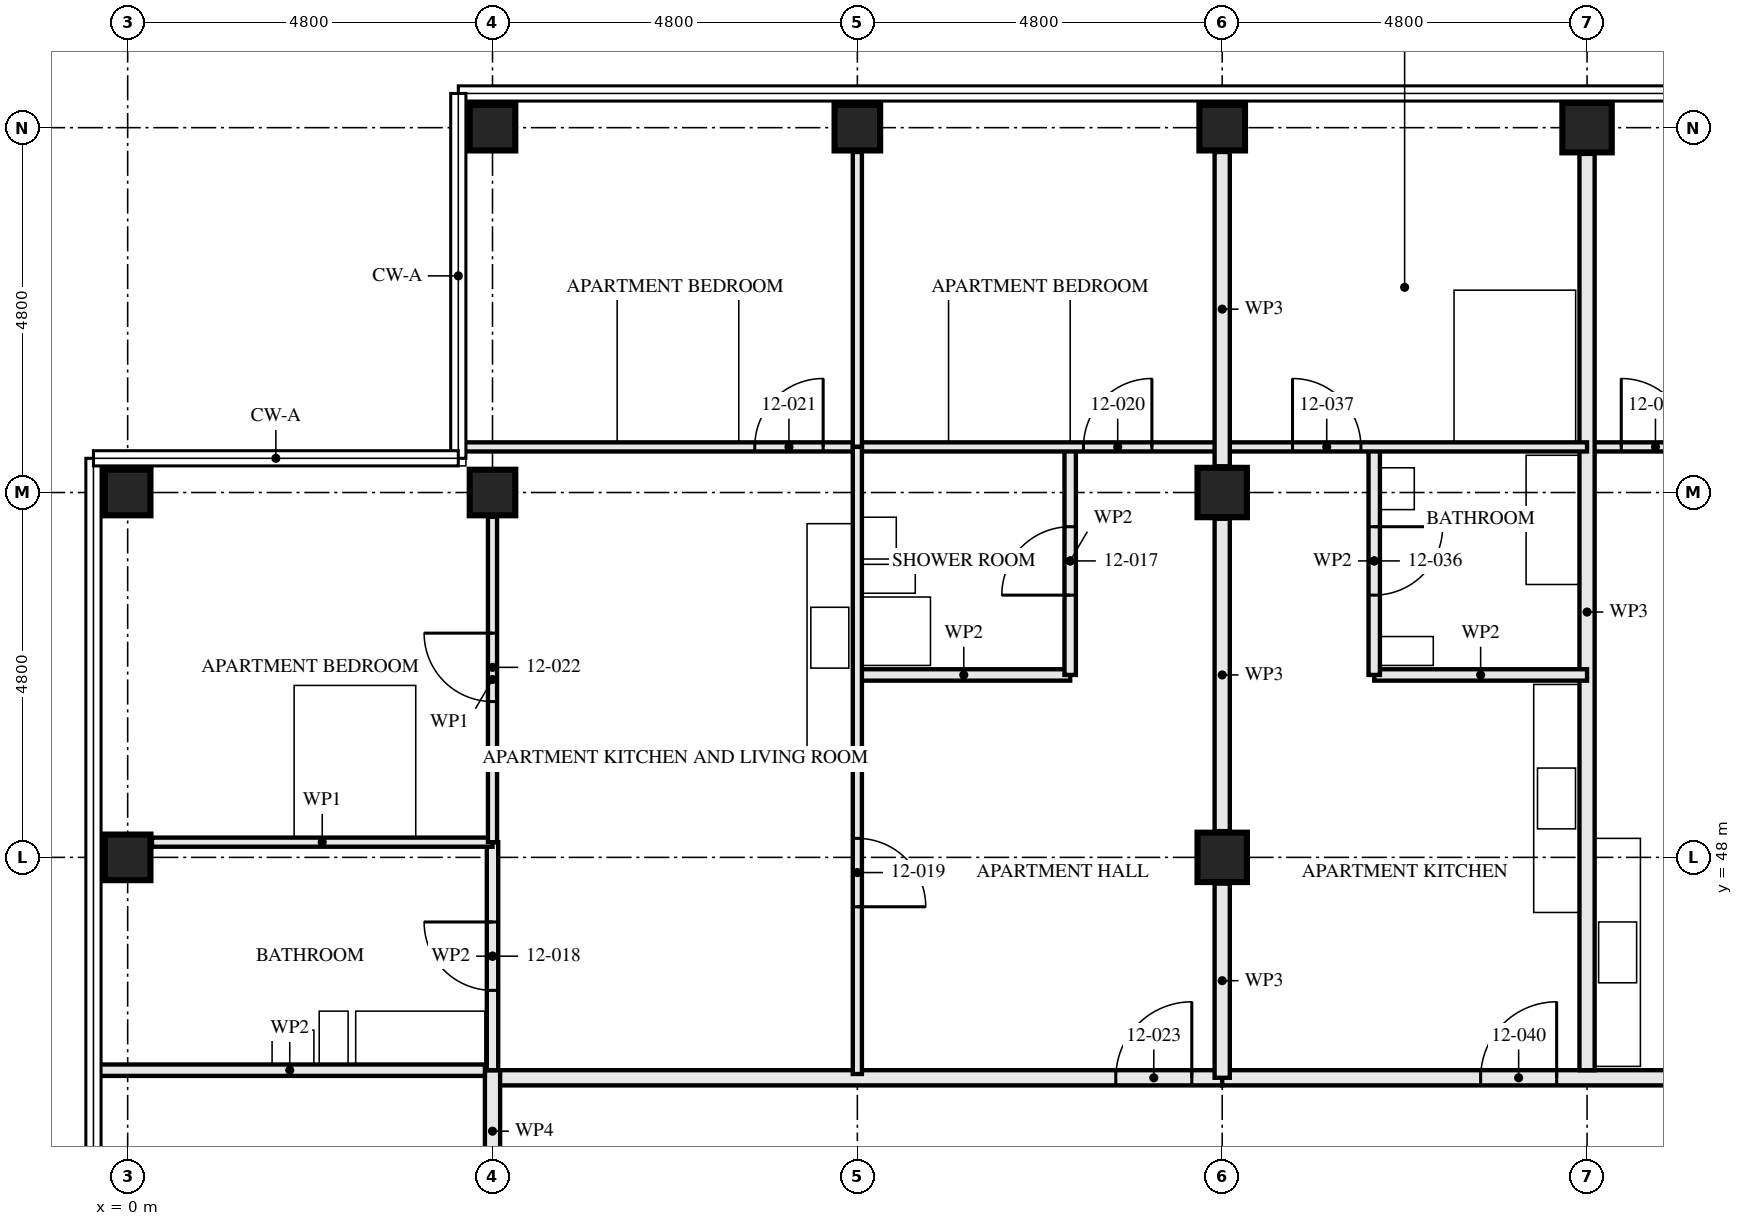
"""IFC4 building model, lengths in metres.
Left out: names, types, materials, properties, quantities, classifications, styles, units other than length and angle.
Written with IfcOpenShell. Run it as: python <this file> out.ifc"""

import sys

from ifc_helpers import new_model, si_unit, direction, frame, frame_2d, origin, origin_2d, place, context, subcontext, project, spatial, rectangle, hollow_rectangle, extrude, element, fill, save


model = new_model("IFC4")
c1 = context("Model", 3, precision=1e-05, world=origin(), true_north=direction((0.0, 1.0)))
c2 = subcontext(c1, "Body", "Model", "MODEL_VIEW")
j1 = project(units=[si_unit("LENGTHUNIT", "METRE"), si_unit("PLANEANGLEUNIT", "RADIAN")], contexts=[c1])
p1 = place(None, origin())
s1 = spatial("IfcSite", under=j1, at=p1, CompositionType="ELEMENT")
p2 = place(p1, origin())
s2 = spatial("IfcBuilding", under=s1, at=p2, CompositionType="ELEMENT")
p3 = place(p2, frame((0.0, 0.0, 48.0)))
s3 = spatial("IfcBuildingStorey", under=s2, at=p3, CompositionType="ELEMENT", Elevation=48.0)
p4 = place(p3, frame((0.0, 48.0, 0.0), z_axis=(0.0, 0.0, 1.0), x_axis=(1.0, 0.0, 0.0)))
e1 = element("IfcColumn", 1, at=p4, inside=s3, PredefinedType="COLUMN", context=c2, shape_type="SweptSolid", body=[
    extrude(hollow_rectangle(XDim=0.6, YDim=0.6, WallThickness=0.08, at=origin_2d()), origin(), (0.0, 0.0, 1.0), 3.5),
])
for number, where, z_axis, x_axis in (
    (2, (0.0, 52.8, 0.0), (0.0, 0.0, 1.0), (0.0, 1.0, 0.0)),
    (3, (4.8, 52.8, 0.0), (0.0, 0.0, 1.0), (0.0, 1.0, 0.0)),
    (4, (4.8, 57.6, 0.0), (0.0, 0.0, 1.0), (0.0, 1.0, 0.0)),
):
    element("IfcColumn", number, at=place(p3, frame(where, z_axis=z_axis, x_axis=x_axis)), inside=s3, PredefinedType="COLUMN", context=c2, shape_type="SweptSolid", body=[
        extrude(hollow_rectangle(XDim=0.6, YDim=0.6, WallThickness=0.06, at=origin_2d()), origin(), (0.0, 0.0, 1.0), 3.5),
    ])
p5 = place(p3, frame((9.6, 57.6, 0.0), z_axis=(0.0, 0.0, 1.0), x_axis=(0.0, 1.0, 0.0)))
e5 = element("IfcColumn", 5, at=p5, inside=s3, PredefinedType="COLUMN", context=c2, shape_type="SweptSolid", body=[
    extrude(hollow_rectangle(XDim=0.6, YDim=0.6, WallThickness=0.08, at=origin_2d()), origin(), (0.0, 0.0, 1.0), 3.5),
])
for number, where, z_axis, x_axis in (
    (6, (14.4, 48.0, 0.0), (0.0, 0.0, 1.0), (1.0, 0.0, 0.0)),
    (7, (14.4, 52.8, 0.0), (0.0, 0.0, 1.0), (1.0, 0.0, 0.0)),
):
    element("IfcColumn", number, at=place(p3, frame(where, z_axis=z_axis, x_axis=x_axis)), inside=s3, PredefinedType="COLUMN", context=c2, shape_type="SweptSolid", body=[
        extrude(hollow_rectangle(XDim=0.65, YDim=0.65, WallThickness=0.05, at=origin_2d()), origin(), (0.0, 0.0, 1.0), 3.5),
    ])
p6 = place(p3, frame((14.4, 57.6, 0.0), z_axis=(0.0, 0.0, 1.0), x_axis=(0.0, 1.0, 0.0)))
e8 = element("IfcColumn", 8, at=p6, inside=s3, PredefinedType="COLUMN", context=c2, shape_type="SweptSolid", body=[
    extrude(hollow_rectangle(XDim=0.6, YDim=0.6, WallThickness=0.08, at=origin_2d()), origin(), (0.0, 0.0, 1.0), 3.5),
])
p7 = place(p3, frame((19.2, 57.6, 0.0), z_axis=(0.0, 0.0, 1.0), x_axis=(0.0, 1.0, 0.0)))
e9 = element("IfcColumn", 9, at=p7, inside=s3, PredefinedType="COLUMN", context=c2, shape_type="SweptSolid", body=[
    extrude(hollow_rectangle(XDim=0.65, YDim=0.65, WallThickness=0.08, at=origin_2d()), origin(), (0.0, 0.0, 1.0), 3.5),
])
p8 = place(p3, frame((12.4, 53.4, 0.0), z_axis=(0.0, 0.0, 1.0), x_axis=(0.0, -1.0, 0.0)))
e10 = element("IfcWall", 10, at=p8, inside=s3, PredefinedType="PARTITIONING", context=c2, shape_type="SweptSolid", body=[
    extrude(rectangle(XDim=3.0, YDim=0.15, at=frame_2d((1.5, 0.0))), origin(), (0.0, 0.0, 1.0), 2.55),
])
p9 = place(p8, frame((1.05, 0.0, 0.0)))
e11 = element("IfcOpeningElement", 11, at=p9, cuts=e10, PredefinedType="OPENING", context=c2, shape_type="SweptSolid", body=[
    extrude(rectangle(XDim=0.9, YDim=2.1, at=frame_2d((0.45, 1.05))), frame((0.0, 0.085, 0.0), z_axis=(0.0, -1.0, 0.0), x_axis=(1.0, 0.0, 0.0)), (0.0, 0.0, 1.0), 0.171),
])
p10 = place(p3, frame((12.4, 50.4, 0.0), z_axis=(0.0, 0.0, 1.0), x_axis=(-1.0, 0.0, 0.0)))
e12 = element("IfcWall", 12, at=p10, inside=s3, PredefinedType="PARTITIONING", context=c2, shape_type="SweptSolid", body=[
    extrude(rectangle(XDim=2.8, YDim=0.15, at=frame_2d((1.4, 0.0))), origin(), (0.0, 0.0, 1.0), 3.33),
])
p11 = place(p3, frame((4.8, 48.2, 0.0), z_axis=(0.0, 0.0, 1.0), x_axis=(0.0, -1.0, 0.0)))
e13 = element("IfcWall", 13, at=p11, inside=s3, PredefinedType="PARTITIONING", context=c2, shape_type="SweptSolid", body=[
    extrude(rectangle(XDim=3.0, YDim=0.15, at=frame_2d((1.5, 0.0))), origin(), (0.0, 0.0, 1.0), 2.55),
])
p12 = place(p11, frame((1.05, 0.0, 0.0)))
e14 = element("IfcOpeningElement", 14, at=p12, cuts=e13, PredefinedType="OPENING", context=c2, shape_type="SweptSolid", body=[
    extrude(rectangle(XDim=0.9, YDim=2.1, at=frame_2d((0.45, 1.05))), frame((0.0, 0.085, 0.0), z_axis=(0.0, -1.0, 0.0), x_axis=(1.0, 0.0, 0.0)), (0.0, 0.0, 1.0), 0.171),
])
p13 = place(p3, frame((9.6, 53.4, 0.0), z_axis=(0.0, 0.0, 1.0), x_axis=(0.0, -1.0, 0.0)))
e15 = element("IfcWall", 15, at=p13, inside=s3, PredefinedType="PARTITIONING", context=c2, shape_type="SweptSolid", body=[
    extrude(rectangle(XDim=8.25, YDim=0.12, at=frame_2d((4.125, 0.0))), origin(), (0.0, 0.0, 1.0), 2.55),
])
p14 = place(p13, frame((5.15, 0.0, 0.0)))
e16 = element("IfcOpeningElement", 16, at=p14, cuts=e15, PredefinedType="OPENING", context=c2, shape_type="SweptSolid", body=[
    extrude(rectangle(XDim=0.9, YDim=2.1, at=frame_2d((0.45, 1.05))), frame((0.0, 0.071, 0.0), z_axis=(0.0, -1.0, 0.0), x_axis=(1.0, 0.0, 0.0)), (0.0, 0.0, 1.0), 0.141),
])
p15 = place(p3, frame((14.4, 53.4, 0.0), z_axis=(0.0, 0.0, 1.0), x_axis=(-1.0, 0.0, 0.0)))
e17 = element("IfcWall", 17, at=p15, inside=s3, PredefinedType="PARTITIONING", context=c2, shape_type="SweptSolid", body=[
    extrude(rectangle(XDim=4.8, YDim=0.12, at=frame_2d((2.4, 0.0))), origin(), (0.0, 0.0, 1.0), 3.33),
])
p16 = place(p15, frame((0.925, 0.0, 0.0)))
e18 = element("IfcOpeningElement", 18, at=p16, cuts=e17, PredefinedType="OPENING", context=c2, shape_type="SweptSolid", body=[
    extrude(rectangle(XDim=0.9, YDim=2.1, at=frame_2d((0.45, 1.05))), frame((0.0, 0.071, 0.0), z_axis=(0.0, -1.0, 0.0), x_axis=(1.0, 0.0, 0.0)), (0.0, 0.0, 1.0), 0.141),
])
p17 = place(p3, frame((9.6, 53.4, 0.0), z_axis=(0.0, 0.0, 1.0), x_axis=(-1.0, 0.0, 0.0)))
e19 = element("IfcWall", 19, at=p17, inside=s3, PredefinedType="PARTITIONING", context=c2, shape_type="SweptSolid", body=[
    extrude(rectangle(XDim=5.235, YDim=0.12, at=frame_2d((2.618, 0.0))), origin(), (0.0, 0.0, 1.0), 2.32),
])
p18 = place(p17, frame((0.45, 0.0, 0.0)))
e20 = element("IfcOpeningElement", 20, at=p18, cuts=e19, PredefinedType="OPENING", context=c2, shape_type="SweptSolid", body=[
    extrude(rectangle(XDim=0.9, YDim=2.1, at=frame_2d((0.45, 1.05))), frame((0.0, 0.071, 0.0), z_axis=(0.0, -1.0, 0.0), x_axis=(1.0, 0.0, 0.0)), (0.0, 0.0, 1.0), 0.141),
])
p19 = place(p3, frame((4.8, 48.2, 0.0), z_axis=(0.0, 0.0, 1.0), x_axis=(-1.0, 0.0, 0.0)))
e21 = element("IfcWall", 21, at=p19, inside=s3, PredefinedType="PARTITIONING", context=c2, shape_type="SweptSolid", body=[
    extrude(rectangle(XDim=4.48, YDim=0.12, at=frame_2d((2.24, 0.0))), origin(), (0.0, 0.0, 1.0), 3.33),
])
p20 = place(p3, frame((9.6, 57.28, 0.0), z_axis=(0.0, 0.0, 1.0), x_axis=(0.0, -1.0, 0.0)))
e22 = element("IfcWall", 22, at=p20, inside=s3, PredefinedType="PARTITIONING", context=c2, shape_type="SweptSolid", body=[
    extrude(rectangle(XDim=3.88, YDim=0.12, at=frame_2d((1.94, 0.0))), origin(), (0.0, 0.0, 1.0), 3.33),
])
p21 = place(p3, frame((4.8, 52.48, 0.0), z_axis=(0.0, 0.0, 1.0), x_axis=(0.0, -1.0, 0.0)))
e23 = element("IfcWall", 23, at=p21, inside=s3, PredefinedType="PARTITIONING", context=c2, shape_type="SweptSolid", body=[
    extrude(rectangle(XDim=4.28, YDim=0.12, at=frame_2d((2.14, 0.0))), origin(), (0.0, 0.0, 1.0), 3.33),
])
p22 = place(p21, frame((1.53, 0.0, 0.0)))
e24 = element("IfcOpeningElement", 24, at=p22, cuts=e23, PredefinedType="OPENING", context=c2, shape_type="SweptSolid", body=[
    extrude(rectangle(XDim=0.9, YDim=2.1, at=frame_2d((0.45, 1.05))), frame((0.0, 0.071, 0.0), z_axis=(0.0, -1.0, 0.0), x_axis=(1.0, 0.0, 0.0)), (0.0, 0.0, 1.0), 0.141),
])
p23 = place(p3, frame((14.4, 45.1, 0.0), z_axis=(0.0, 0.0, 1.0), x_axis=(-1.0, 0.0, 0.0)))
e25 = element("IfcWall", 25, at=p23, inside=s3, PredefinedType="PARTITIONING", context=c2, shape_type="SweptSolid", body=[
    extrude(rectangle(XDim=9.6, YDim=0.2, at=frame_2d((4.8, 0.0))), origin(), (0.0, 0.0, 1.0), 3.33),
])
p24 = place(p23, frame((0.4, 0.0, 0.0)))
e26 = element("IfcOpeningElement", 26, at=p24, cuts=e25, PredefinedType="OPENING", context=c2, shape_type="SweptSolid", body=[
    extrude(rectangle(XDim=1.0, YDim=2.1, at=frame_2d((0.5, 1.05))), frame((0.0, 0.111, 0.0), z_axis=(0.0, -1.0, 0.0), x_axis=(1.0, 0.0, 0.0)), (0.0, 0.0, 1.0), 0.221),
])
p25 = place(p3, frame((4.8, 45.2, 0.0), z_axis=(0.0, 0.0, 1.0), x_axis=(0.0, -1.0, 0.0)))
e27 = element("IfcWall", 27, at=p25, inside=s3, PredefinedType="PARTITIONING", context=c2, shape_type="SweptSolid", body=[
    extrude(rectangle(XDim=1.605, YDim=0.2, at=frame_2d((0.802, 0.0))), origin(), (0.0, 0.0, 1.0), 3.33),
])
p26 = place(p3, frame((24.0, 53.4, 0.0), z_axis=(0.0, 0.0, 1.0), x_axis=(-1.0, 0.0, 0.0)))
e28 = element("IfcWall", 28, at=p26, inside=s3, PredefinedType="PARTITIONING", context=c2, shape_type="SweptSolid", body=[
    extrude(rectangle(XDim=4.8, YDim=0.12, at=frame_2d((2.4, 0.0))), origin(), (0.0, 0.0, 1.0), 3.33),
])
p27 = place(p26, frame((3.45, 0.0, 0.0)))
e29 = element("IfcOpeningElement", 29, at=p27, cuts=e28, PredefinedType="OPENING", context=c2, shape_type="SweptSolid", body=[
    extrude(rectangle(XDim=0.9, YDim=2.1, at=frame_2d((0.45, 1.05))), frame((0.0, 0.071, 0.0), z_axis=(0.0, -1.0, 0.0), x_axis=(1.0, 0.0, 0.0)), (0.0, 0.0, 1.0), 0.141),
])
p28 = place(p3, frame((19.2, 57.255, 0.0), z_axis=(0.0, 0.0, 1.0), x_axis=(0.0, -1.0, 0.0)))
e30 = element("IfcWall", 30, at=p28, inside=s3, PredefinedType="PARTITIONING", context=c2, shape_type="SweptSolid", body=[
    extrude(rectangle(XDim=12.055, YDim=0.2, at=frame_2d((6.027, 0.0))), origin(), (0.0, 0.0, 1.0), 2.55),
])
p29 = place(p3, frame((16.4, 53.4, 0.0), z_axis=(0.0, 0.0, 1.0), x_axis=(0.0, -1.0, 0.0)))
e31 = element("IfcWall", 31, at=p29, inside=s3, PredefinedType="PARTITIONING", context=c2, shape_type="SweptSolid", body=[
    extrude(rectangle(XDim=3.0, YDim=0.15, at=frame_2d((1.5, 0.0))), origin(), (0.0, 0.0, 1.0), 2.55),
])
p30 = place(p29, frame((1.05, 0.0, 0.0)))
e32 = element("IfcOpeningElement", 32, at=p30, cuts=e31, PredefinedType="OPENING", context=c2, shape_type="SweptSolid", body=[
    extrude(rectangle(XDim=0.9, YDim=2.1, at=frame_2d((0.45, 1.05))), frame((0.0, 0.085, 0.0), z_axis=(0.0, -1.0, 0.0), x_axis=(1.0, 0.0, 0.0)), (0.0, 0.0, 1.0), 0.171),
])
p31 = place(p3, frame((19.2, 50.4, 0.0), z_axis=(0.0, 0.0, 1.0), x_axis=(-1.0, 0.0, 0.0)))
e33 = element("IfcWall", 33, at=p31, inside=s3, PredefinedType="PARTITIONING", context=c2, shape_type="SweptSolid", body=[
    extrude(rectangle(XDim=2.8, YDim=0.15, at=frame_2d((1.4, 0.0))), origin(), (0.0, 0.0, 1.0), 3.33),
])
p32 = place(p3, frame((19.2, 53.4, 0.0), z_axis=(0.0, 0.0, 1.0), x_axis=(-1.0, 0.0, 0.0)))
e34 = element("IfcWall", 34, at=p32, inside=s3, PredefinedType="PARTITIONING", context=c2, shape_type="SweptSolid", body=[
    extrude(rectangle(XDim=4.8, YDim=0.12, at=frame_2d((2.4, 0.0))), origin(), (0.0, 0.0, 1.0), 3.33),
])
p33 = place(p32, frame((2.975, 0.0, 0.0)))
e35 = element("IfcOpeningElement", 35, at=p33, cuts=e34, PredefinedType="OPENING", context=c2, shape_type="SweptSolid", body=[
    extrude(rectangle(XDim=0.9, YDim=2.1, at=frame_2d((0.45, 1.05))), frame((0.0, 0.071, 0.0), z_axis=(0.0, -1.0, 0.0), x_axis=(1.0, 0.0, 0.0)), (0.0, 0.0, 1.0), 0.141),
])
p34 = place(p3, frame((28.8, 45.1, 0.0), z_axis=(0.0, 0.0, 1.0), x_axis=(-1.0, 0.0, 0.0)))
e36 = element("IfcWall", 36, at=p34, inside=s3, PredefinedType="PARTITIONING", context=c2, shape_type="SweptSolid", body=[
    extrude(rectangle(XDim=14.4, YDim=0.2, at=frame_2d((7.2, 0.0))), origin(), (0.0, 0.0, 1.0), 3.33),
])
p35 = place(p34, frame((0.4, 0.0, 0.0)))
e37 = element("IfcOpeningElement", 37, at=p35, cuts=e36, PredefinedType="OPENING", context=c2, shape_type="SweptSolid", body=[
    extrude(rectangle(XDim=1.0, YDim=2.1, at=frame_2d((0.5, 1.05))), frame((0.0, 0.111, 0.0), z_axis=(0.0, -1.0, 0.0), x_axis=(1.0, 0.0, 0.0)), (0.0, 0.0, 1.0), 0.221),
])
p36 = place(p34, frame((5.2, 0.0, 0.0)))
e38 = element("IfcOpeningElement", 38, at=p36, cuts=e36, PredefinedType="OPENING", context=c2, shape_type="SweptSolid", body=[
    extrude(rectangle(XDim=1.0, YDim=2.1, at=frame_2d((0.5, 1.05))), frame((0.0, 0.111, 0.0), z_axis=(0.0, -1.0, 0.0), x_axis=(1.0, 0.0, 0.0)), (0.0, 0.0, 1.0), 0.221),
])
p37 = place(p34, frame((10.0, 0.0, 0.0)))
e39 = element("IfcOpeningElement", 39, at=p37, cuts=e36, PredefinedType="OPENING", context=c2, shape_type="SweptSolid", body=[
    extrude(rectangle(XDim=1.0, YDim=2.1, at=frame_2d((0.5, 1.05))), frame((0.0, 0.111, 0.0), z_axis=(0.0, -1.0, 0.0), x_axis=(1.0, 0.0, 0.0)), (0.0, 0.0, 1.0), 0.221),
])
p38 = place(p3, frame((14.4, 45.1, 0.0), z_axis=(0.0, 0.0, 1.0), x_axis=(0.0, 1.0, 0.0)))
e40 = element("IfcWall", 40, at=p38, inside=s3, PredefinedType="PARTITIONING", context=c2, shape_type="SweptSolid", body=[
    extrude(rectangle(XDim=2.555, YDim=0.2, at=frame_2d((1.277, 0.0))), origin(), (0.0, 0.0, 1.0), 2.32),
])
p39 = place(p3, frame((14.4, 48.345, 0.0), z_axis=(0.0, 0.0, 1.0), x_axis=(0.0, 1.0, 0.0)))
e41 = element("IfcWall", 41, at=p39, inside=s3, PredefinedType="PARTITIONING", context=c2, shape_type="SweptSolid", body=[
    extrude(rectangle(XDim=4.11, YDim=0.2, at=frame_2d((2.055, 0.0))), origin(), (0.0, 0.0, 1.0), 2.32),
])
p40 = place(p3, frame((14.4, 53.145, 0.0), z_axis=(0.0, 0.0, 1.0), x_axis=(0.0, 1.0, 0.0)))
e42 = element("IfcWall", 42, at=p40, inside=s3, PredefinedType="PARTITIONING", context=c2, shape_type="SweptSolid", body=[
    extrude(rectangle(XDim=4.135, YDim=0.2, at=frame_2d((2.067, 0.0))), origin(), (0.0, 0.0, 1.0), 2.32),
])
p41 = place(p3, frame((4.7, 45.2, 0.0), z_axis=(0.0, 0.0, 1.0), x_axis=(-1.0, 0.0, 0.0)))
e43 = element("IfcWall", 43, at=p41, inside=s3, PredefinedType="PARTITIONING", context=c2, shape_type="SweptSolid", body=[
    extrude(rectangle(XDim=5.135, YDim=0.15, at=frame_2d((2.567, 0.0))), origin(), (0.0, 0.0, 1.0), 2.32),
])
p42 = place(p9, frame((0.9, 0.0, 0.0), z_axis=(0.0, 0.0, 1.0), x_axis=(-1.0, 0.0, 0.0)))
e44 = element("IfcDoor", 44, at=p42, inside=s3, OperationType="SINGLE_SWING_RIGHT", PredefinedType="DOOR", context=c2, shape_type="SweptSolid", body=[
    extrude(rectangle(XDim=0.9, YDim=2.1, at=frame_2d((0.45, 1.05))), frame((0.0, 0.022, 0.0), z_axis=(0.0, -1.0, 0.0), x_axis=(1.0, 0.0, 0.0)), (0.0, 0.0, 1.0), 0.044),
])
fill(e11, e44)
p43 = place(p12, frame((0.9, 0.0, 0.0), z_axis=(0.0, 0.0, 1.0), x_axis=(-1.0, 0.0, 0.0)))
e45 = element("IfcDoor", 45, at=p43, inside=s3, OperationType="SINGLE_SWING_LEFT", PredefinedType="DOOR", context=c2, shape_type="SweptSolid", body=[
    extrude(rectangle(XDim=0.9, YDim=2.1, at=frame_2d((0.45, 1.05))), frame((0.0, 0.022, 0.0), z_axis=(0.0, -1.0, 0.0), x_axis=(1.0, 0.0, 0.0)), (0.0, 0.0, 1.0), 0.044),
])
fill(e14, e45)
p44 = place(p14, origin())
e46 = element("IfcDoor", 46, at=p44, inside=s3, OperationType="SINGLE_SWING_LEFT", PredefinedType="DOOR", context=c2, shape_type="SweptSolid", body=[
    extrude(rectangle(XDim=0.9, YDim=2.1, at=frame_2d((0.45, 1.05))), frame((0.0, 0.022, 0.0), z_axis=(0.0, -1.0, 0.0), x_axis=(1.0, 0.0, 0.0)), (0.0, 0.0, 1.0), 0.044),
])
fill(e16, e46)
p45 = place(p16, frame((0.9, 0.0, 0.0), z_axis=(0.0, 0.0, 1.0), x_axis=(-1.0, 0.0, 0.0)))
e47 = element("IfcDoor", 47, at=p45, inside=s3, OperationType="SINGLE_SWING_LEFT", PredefinedType="DOOR", context=c2, shape_type="SweptSolid", body=[
    extrude(rectangle(XDim=0.9, YDim=2.1, at=frame_2d((0.45, 1.05))), frame((0.0, 0.022, 0.0), z_axis=(0.0, -1.0, 0.0), x_axis=(1.0, 0.0, 0.0)), (0.0, 0.0, 1.0), 0.044),
])
fill(e18, e47)
p46 = place(p18, frame((0.9, 0.0, 0.0), z_axis=(0.0, 0.0, 1.0), x_axis=(-1.0, 0.0, 0.0)))
e48 = element("IfcDoor", 48, at=p46, inside=s3, OperationType="SINGLE_SWING_LEFT", PredefinedType="DOOR", context=c2, shape_type="SweptSolid", body=[
    extrude(rectangle(XDim=0.9, YDim=2.1, at=frame_2d((0.45, 1.05))), frame((0.0, 0.022, 0.0), z_axis=(0.0, -1.0, 0.0), x_axis=(1.0, 0.0, 0.0)), (0.0, 0.0, 1.0), 0.044),
])
fill(e20, e48)
p47 = place(p22, frame((0.9, 0.0, 0.0), z_axis=(0.0, 0.0, 1.0), x_axis=(-1.0, 0.0, 0.0)))
e49 = element("IfcDoor", 49, at=p47, inside=s3, OperationType="SINGLE_SWING_LEFT", PredefinedType="DOOR", context=c2, shape_type="SweptSolid", body=[
    extrude(rectangle(XDim=0.9, YDim=2.1, at=frame_2d((0.45, 1.05))), frame((0.0, 0.022, 0.0), z_axis=(0.0, -1.0, 0.0), x_axis=(1.0, 0.0, 0.0)), (0.0, 0.0, 1.0), 0.044),
])
fill(e24, e49)
p48 = place(p24, frame((1.0, 0.0, 0.0), z_axis=(0.0, 0.0, 1.0), x_axis=(-1.0, 0.0, 0.0)))
e50 = element("IfcDoor", 50, at=p48, inside=s3, OperationType="SINGLE_SWING_LEFT", PredefinedType="DOOR", context=c2, shape_type="SweptSolid", body=[
    extrude(rectangle(XDim=1.0, YDim=2.1, at=frame_2d((0.5, 1.05))), frame((0.0, 0.027, 0.0), z_axis=(0.0, -1.0, 0.0), x_axis=(1.0, 0.0, 0.0)), (0.0, 0.0, 1.0), 0.054),
])
fill(e26, e50)
p49 = place(p27, frame((0.9, 0.0, 0.0), z_axis=(0.0, 0.0, 1.0), x_axis=(-1.0, 0.0, 0.0)))
e51 = element("IfcDoor", 51, at=p49, inside=s3, OperationType="SINGLE_SWING_RIGHT", PredefinedType="DOOR", context=c2, shape_type="SweptSolid", body=[
    extrude(rectangle(XDim=0.9, YDim=2.1, at=frame_2d((0.45, 1.05))), frame((0.0, 0.022, 0.0), z_axis=(0.0, -1.0, 0.0), x_axis=(1.0, 0.0, 0.0)), (0.0, 0.0, 1.0), 0.044),
])
fill(e29, e51)
p50 = place(p30, origin())
e52 = element("IfcDoor", 52, at=p50, inside=s3, OperationType="SINGLE_SWING_RIGHT", PredefinedType="DOOR", context=c2, shape_type="SweptSolid", body=[
    extrude(rectangle(XDim=0.9, YDim=2.1, at=frame_2d((0.45, 1.05))), frame((0.0, 0.022, 0.0), z_axis=(0.0, -1.0, 0.0), x_axis=(1.0, 0.0, 0.0)), (0.0, 0.0, 1.0), 0.044),
])
fill(e32, e52)
p51 = place(p33, frame((0.9, 0.0, 0.0), z_axis=(0.0, 0.0, 1.0), x_axis=(-1.0, 0.0, 0.0)))
e53 = element("IfcDoor", 53, at=p51, inside=s3, OperationType="SINGLE_SWING_RIGHT", PredefinedType="DOOR", context=c2, shape_type="SweptSolid", body=[
    extrude(rectangle(XDim=0.9, YDim=2.1, at=frame_2d((0.45, 1.05))), frame((0.0, 0.022, 0.0), z_axis=(0.0, -1.0, 0.0), x_axis=(1.0, 0.0, 0.0)), (0.0, 0.0, 1.0), 0.044),
])
fill(e35, e53)
p52 = place(p37, frame((1.0, 0.0, 0.0), z_axis=(0.0, 0.0, 1.0), x_axis=(-1.0, 0.0, 0.0)))
e54 = element("IfcDoor", 54, at=p52, inside=s3, OperationType="SINGLE_SWING_LEFT", PredefinedType="DOOR", context=c2, shape_type="SweptSolid", body=[
    extrude(rectangle(XDim=1.0, YDim=2.1, at=frame_2d((0.5, 1.05))), frame((0.0, 0.027, 0.0), z_axis=(0.0, -1.0, 0.0), x_axis=(1.0, 0.0, 0.0)), (0.0, 0.0, 1.0), 0.054),
])
fill(e39, e54)
save(model, sys.argv[1])
